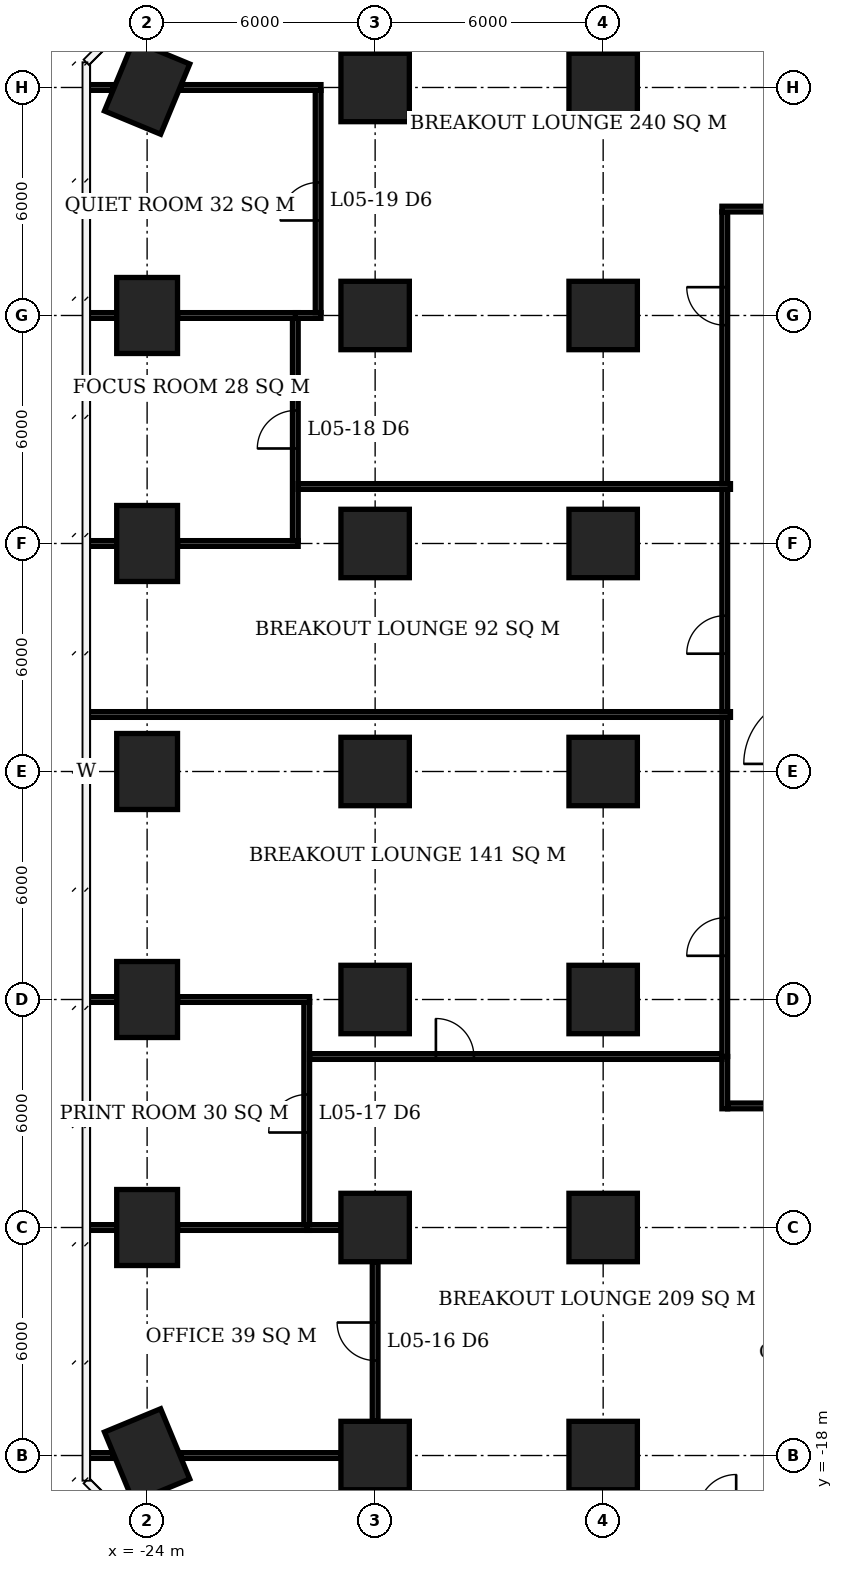
"""IFC4 building model, lengths in metres.
Left out: names, types, materials, properties, quantities, classifications, styles, units other than length and angle.
Written with IfcOpenShell. Run it as: python <this file> out.ifc"""

import sys

from ifc_helpers import new_model, si_unit, direction, frame, frame_2d, origin, origin_2d, place, context, subcontext, project, spatial, rectangle, extrude, element, fill, save


model = new_model("IFC4")
c1 = context("Model", 3, precision=1e-05, world=origin(), true_north=direction((0.0, 1.0)))
c2 = subcontext(c1, "Body", "Model", "MODEL_VIEW")
j1 = project(units=[si_unit("LENGTHUNIT", "METRE"), si_unit("PLANEANGLEUNIT", "RADIAN")], contexts=[c1])
p1 = place(None, origin())
s1 = spatial("IfcSite", under=j1, at=p1, CompositionType="ELEMENT")
p2 = place(p1, origin())
s2 = spatial("IfcBuilding", under=s1, at=p2, CompositionType="ELEMENT")
p3 = place(p2, frame((0.0, 0.0, 26.0)))
s3 = spatial("IfcBuildingStorey", under=s2, at=p3, CompositionType="ELEMENT", Elevation=26.0)
for number, where, z_axis, x_axis in (
    (1, (-24.0, -18.0, 0.0), (0.0, 0.0, 1.0), (-0.383, 0.924, 0.0)),
    (2, (-24.0, -12.0, 0.0), (0.0, 0.0, 1.0), (0.0, 1.0, 0.0)),
    (3, (-24.0, -6.0, 0.0), (0.0, 0.0, 1.0), (0.0, 1.0, 0.0)),
    (4, (-24.0, 0.0, 0.0), (0.0, 0.0, 1.0), (0.0, 1.0, 0.0)),
    (5, (-24.0, 6.0, 0.0), (0.0, 0.0, 1.0), (0.0, 1.0, 0.0)),
    (6, (-24.0, 12.0, 0.0), (0.0, 0.0, 1.0), (0.0, 1.0, 0.0)),
    (7, (-24.0, 18.0, 0.0), (0.0, 0.0, 1.0), (0.383, 0.924, 0.0)),
):
    element("IfcColumn", number, at=place(p3, frame(where, z_axis=z_axis, x_axis=x_axis)), inside=s3, PredefinedType="COLUMN", context=c2, shape_type="SweptSolid", body=[
        extrude(rectangle(XDim=2.0, YDim=1.6, at=origin_2d()), origin(), (0.0, 0.0, 1.0), 3.9),
    ])
for number, where, z_axis, x_axis in (
    (8, (-18.0, -18.0, 0.0), (0.0, 0.0, 1.0), (1.0, 0.0, 0.0)),
    (9, (-18.0, -12.0, 0.0), (0.0, 0.0, 1.0), (1.0, 0.0, 0.0)),
    (10, (-18.0, -6.0, 0.0), (0.0, 0.0, 1.0), (1.0, 0.0, 0.0)),
    (11, (-18.0, 0.0, 0.0), (0.0, 0.0, 1.0), (1.0, 0.0, 0.0)),
    (12, (-18.0, 6.0, 0.0), (0.0, 0.0, 1.0), (1.0, 0.0, 0.0)),
    (13, (-18.0, 12.0, 0.0), (0.0, 0.0, 1.0), (1.0, 0.0, 0.0)),
    (14, (-18.0, 18.0, 0.0), (0.0, 0.0, 1.0), (1.0, 0.0, 0.0)),
    (15, (-12.0, -18.0, 0.0), (0.0, 0.0, 1.0), (1.0, 0.0, 0.0)),
    (16, (-12.0, -12.0, 0.0), (0.0, 0.0, 1.0), (1.0, 0.0, 0.0)),
    (17, (-12.0, -6.0, 0.0), (0.0, 0.0, 1.0), (1.0, 0.0, 0.0)),
    (18, (-12.0, 0.0, 0.0), (0.0, 0.0, 1.0), (1.0, 0.0, 0.0)),
    (19, (-12.0, 6.0, 0.0), (0.0, 0.0, 1.0), (1.0, 0.0, 0.0)),
    (20, (-12.0, 12.0, 0.0), (0.0, 0.0, 1.0), (1.0, 0.0, 0.0)),
    (21, (-12.0, 18.0, 0.0), (0.0, 0.0, 1.0), (1.0, 0.0, 0.0)),
):
    element("IfcColumn", number, at=place(p3, frame(where, z_axis=z_axis, x_axis=x_axis)), inside=s3, PredefinedType="COLUMN", context=c2, shape_type="SweptSolid", body=[
        extrude(rectangle(XDim=1.8, YDim=1.8, at=origin_2d()), origin(), (0.0, 0.0, 1.0), 3.9),
    ])
p4 = place(p3, frame((-25.6, -18.0, 0.0), z_axis=(0.0, 0.0, 1.0), x_axis=(1.0, 0.0, 0.0)))
e22 = element("IfcWall", 22, at=p4, inside=s3, PredefinedType="PARTITIONING", context=c2, shape_type="SweptSolid", body=[
    extrude(rectangle(XDim=0.703, YDim=0.15, at=frame_2d((0.352, 0.0))), origin(), (0.0, 0.0, 1.0), 3.65),
])
p5 = place(p3, frame((-23.103, -18.0, 0.0), z_axis=(0.0, 0.0, 1.0), x_axis=(1.0, 0.0, 0.0)))
e23 = element("IfcWall", 23, at=p5, inside=s3, PredefinedType="PARTITIONING", context=c2, shape_type="SweptSolid", body=[
    extrude(rectangle(XDim=4.203, YDim=0.15, at=frame_2d((2.102, 0.0))), origin(), (0.0, 0.0, 1.0), 3.65),
])
p6 = place(p3, frame((-25.6, -12.0, 0.0), z_axis=(0.0, 0.0, 1.0), x_axis=(1.0, 0.0, 0.0)))
e24 = element("IfcWall", 24, at=p6, inside=s3, PredefinedType="PARTITIONING", context=c2, shape_type="SweptSolid", body=[
    extrude(rectangle(XDim=0.8, YDim=0.15, at=frame_2d((0.4, 0.0))), origin(), (0.0, 0.0, 1.0), 3.65),
])
p7 = place(p3, frame((-23.2, -12.0, 0.0), z_axis=(0.0, 0.0, 1.0), x_axis=(1.0, 0.0, 0.0)))
e25 = element("IfcWall", 25, at=p7, inside=s3, PredefinedType="PARTITIONING", context=c2, shape_type="SweptSolid", body=[
    extrude(rectangle(XDim=3.475, YDim=0.15, at=frame_2d((1.737, 0.0))), origin(), (0.0, 0.0, 1.0), 3.65),
])
p8 = place(p3, frame((-19.8, -12.0, 0.0), z_axis=(0.0, 0.0, 1.0), x_axis=(1.0, 0.0, 0.0)))
e26 = element("IfcWall", 26, at=p8, inside=s3, PredefinedType="PARTITIONING", context=c2, shape_type="SweptSolid", body=[
    extrude(rectangle(XDim=0.9, YDim=0.15, at=frame_2d((0.45, 0.0))), origin(), (0.0, 0.0, 1.0), 3.65),
])
p9 = place(p3, frame((-25.6, -6.0, 0.0), z_axis=(0.0, 0.0, 1.0), x_axis=(1.0, 0.0, 0.0)))
e27 = element("IfcWall", 27, at=p9, inside=s3, PredefinedType="PARTITIONING", context=c2, shape_type="SweptSolid", body=[
    extrude(rectangle(XDim=0.8, YDim=0.15, at=frame_2d((0.4, 0.0))), origin(), (0.0, 0.0, 1.0), 3.65),
])
p10 = place(p3, frame((-23.2, -6.0, 0.0), z_axis=(0.0, 0.0, 1.0), x_axis=(1.0, 0.0, 0.0)))
e28 = element("IfcWall", 28, at=p10, inside=s3, PredefinedType="PARTITIONING", context=c2, shape_type="SweptSolid", body=[
    extrude(rectangle(XDim=3.475, YDim=0.15, at=frame_2d((1.737, 0.0))), origin(), (0.0, 0.0, 1.0), 3.65),
])
p11 = place(p3, frame((-25.6, 6.0, 0.0), z_axis=(0.0, 0.0, 1.0), x_axis=(1.0, 0.0, 0.0)))
e29 = element("IfcWall", 29, at=p11, inside=s3, PredefinedType="PARTITIONING", context=c2, shape_type="SweptSolid", body=[
    extrude(rectangle(XDim=0.8, YDim=0.15, at=frame_2d((0.4, 0.0))), origin(), (0.0, 0.0, 1.0), 3.65),
])
p12 = place(p3, frame((-23.2, 6.0, 0.0), z_axis=(0.0, 0.0, 1.0), x_axis=(1.0, 0.0, 0.0)))
e30 = element("IfcWall", 30, at=p12, inside=s3, PredefinedType="PARTITIONING", context=c2, shape_type="SweptSolid", body=[
    extrude(rectangle(XDim=3.175, YDim=0.15, at=frame_2d((1.587, 0.0))), origin(), (0.0, 0.0, 1.0), 3.65),
])
p13 = place(p3, frame((-25.6, 12.0, 0.0), z_axis=(0.0, 0.0, 1.0), x_axis=(1.0, 0.0, 0.0)))
e31 = element("IfcWall", 31, at=p13, inside=s3, PredefinedType="PARTITIONING", context=c2, shape_type="SweptSolid", body=[
    extrude(rectangle(XDim=0.8, YDim=0.15, at=frame_2d((0.4, 0.0))), origin(), (0.0, 0.0, 1.0), 3.65),
])
p14 = place(p3, frame((-23.2, 12.0, 0.0), z_axis=(0.0, 0.0, 1.0), x_axis=(1.0, 0.0, 0.0)))
e32 = element("IfcWall", 32, at=p14, inside=s3, PredefinedType="PARTITIONING", context=c2, shape_type="SweptSolid", body=[
    extrude(rectangle(XDim=3.175, YDim=0.15, at=frame_2d((1.587, 0.0))), origin(), (0.0, 0.0, 1.0), 3.65),
])
p15 = place(p3, frame((-20.1, 12.0, 0.0), z_axis=(0.0, 0.0, 1.0), x_axis=(1.0, 0.0, 0.0)))
e33 = element("IfcWall", 33, at=p15, inside=s3, PredefinedType="PARTITIONING", context=c2, shape_type="SweptSolid", body=[
    extrude(rectangle(XDim=0.675, YDim=0.15, at=frame_2d((0.337, 0.0))), origin(), (0.0, 0.0, 1.0), 3.65),
])
p16 = place(p3, frame((-25.6, 18.0, 0.0), z_axis=(0.0, 0.0, 1.0), x_axis=(1.0, 0.0, 0.0)))
e34 = element("IfcWall", 34, at=p16, inside=s3, PredefinedType="PARTITIONING", context=c2, shape_type="SweptSolid", body=[
    extrude(rectangle(XDim=0.703, YDim=0.15, at=frame_2d((0.352, 0.0))), origin(), (0.0, 0.0, 1.0), 3.65),
])
p17 = place(p3, frame((-23.103, 18.0, 0.0), z_axis=(0.0, 0.0, 1.0), x_axis=(1.0, 0.0, 0.0)))
e35 = element("IfcWall", 35, at=p17, inside=s3, PredefinedType="PARTITIONING", context=c2, shape_type="SweptSolid", body=[
    extrude(rectangle(XDim=3.678, YDim=0.15, at=frame_2d((1.839, 0.0))), origin(), (0.0, 0.0, 1.0), 3.65),
])
p18 = place(p3, frame((-20.1, 6.075, 0.0), z_axis=(0.0, 0.0, 1.0), x_axis=(0.0, 1.0, 0.0)))
e36 = element("IfcWall", 36, at=p18, inside=s3, PredefinedType="PARTITIONING", context=c2, shape_type="SweptSolid", body=[
    extrude(rectangle(XDim=5.85, YDim=0.15, at=frame_2d((2.925, 0.0))), origin(), (0.0, 0.0, 1.0), 3.65),
])
p19 = place(p18, frame((2.425, 0.0, 0.0)))
e37 = element("IfcOpeningElement", 37, at=p19, cuts=e36, PredefinedType="OPENING", context=c2, shape_type="SweptSolid", body=[
    extrude(rectangle(XDim=1.0, YDim=2.1, at=frame_2d((0.5, 1.05))), frame((0.0, 0.085, 0.0), z_axis=(0.0, -1.0, 0.0), x_axis=(1.0, 0.0, 0.0)), (0.0, 0.0, 1.0), 0.17),
])
p20 = place(p3, frame((-19.8, -11.925, 0.0), z_axis=(0.0, 0.0, 1.0), x_axis=(0.0, 1.0, 0.0)))
e38 = element("IfcWall", 38, at=p20, inside=s3, PredefinedType="PARTITIONING", context=c2, shape_type="SweptSolid", body=[
    extrude(rectangle(XDim=5.85, YDim=0.15, at=frame_2d((2.925, 0.0))), origin(), (0.0, 0.0, 1.0), 3.65),
])
p21 = place(p20, frame((2.425, 0.0, 0.0)))
e39 = element("IfcOpeningElement", 39, at=p21, cuts=e38, PredefinedType="OPENING", context=c2, shape_type="SweptSolid", body=[
    extrude(rectangle(XDim=1.0, YDim=2.1, at=frame_2d((0.5, 1.05))), frame((0.0, 0.085, 0.0), z_axis=(0.0, -1.0, 0.0), x_axis=(1.0, 0.0, 0.0)), (0.0, 0.0, 1.0), 0.17),
])
p22 = place(p3, frame((-19.5, 12.075, 0.0), z_axis=(0.0, 0.0, 1.0), x_axis=(0.0, 1.0, 0.0)))
e40 = element("IfcWall", 40, at=p22, inside=s3, PredefinedType="PARTITIONING", context=c2, shape_type="SweptSolid", body=[
    extrude(rectangle(XDim=5.85, YDim=0.15, at=frame_2d((2.925, 0.0))), origin(), (0.0, 0.0, 1.0), 3.65),
])
p23 = place(p22, frame((2.425, 0.0, 0.0)))
e41 = element("IfcOpeningElement", 41, at=p23, cuts=e40, PredefinedType="OPENING", context=c2, shape_type="SweptSolid", body=[
    extrude(rectangle(XDim=1.0, YDim=2.1, at=frame_2d((0.5, 1.05))), frame((0.0, 0.085, 0.0), z_axis=(0.0, -1.0, 0.0), x_axis=(1.0, 0.0, 0.0)), (0.0, 0.0, 1.0), 0.17),
])
p24 = place(p3, frame((-18.0, -17.1, 0.0), z_axis=(0.0, 0.0, 1.0), x_axis=(0.0, 1.0, 0.0)))
e42 = element("IfcWall", 42, at=p24, inside=s3, PredefinedType="PARTITIONING", context=c2, shape_type="SweptSolid", body=[
    extrude(rectangle(XDim=4.2, YDim=0.15, at=frame_2d((2.1, 0.0))), origin(), (0.0, 0.0, 1.0), 3.65),
])
p25 = place(p24, frame((1.6, 0.0, 0.0)))
e43 = element("IfcOpeningElement", 43, at=p25, cuts=e42, PredefinedType="OPENING", context=c2, shape_type="SweptSolid", body=[
    extrude(rectangle(XDim=1.0, YDim=2.1, at=frame_2d((0.5, 1.05))), frame((0.0, 0.085, 0.0), z_axis=(0.0, -1.0, 0.0), x_axis=(1.0, 0.0, 0.0)), (0.0, 0.0, 1.0), 0.17),
])
p26 = place(p3, frame((-25.6, 1.5, 0.0), z_axis=(0.0, 0.0, 1.0), x_axis=(1.0, 0.0, 0.0)))
e44 = element("IfcWall", 44, at=p26, inside=s3, PredefinedType="PARTITIONING", context=c2, shape_type="SweptSolid", body=[
    extrude(rectangle(XDim=16.95, YDim=0.15, at=frame_2d((8.475, 0.0))), origin(), (0.0, 0.0, 1.0), 3.65),
])
p27 = place(p3, frame((-20.025, 7.5, 0.0), z_axis=(0.0, 0.0, 1.0), x_axis=(1.0, 0.0, 0.0)))
e45 = element("IfcWall", 45, at=p27, inside=s3, PredefinedType="PARTITIONING", context=c2, shape_type="SweptSolid", body=[
    extrude(rectangle(XDim=11.375, YDim=0.15, at=frame_2d((5.688, 0.0))), origin(), (0.0, 0.0, 1.0), 3.65),
])
p28 = place(p3, frame((-19.725, -7.5, 0.0), z_axis=(0.0, 0.0, 1.0), x_axis=(1.0, 0.0, 0.0)))
e46 = element("IfcWall", 46, at=p28, inside=s3, PredefinedType="PARTITIONING", context=c2, shape_type="SweptSolid", body=[
    extrude(rectangle(XDim=10.85, YDim=0.15, at=frame_2d((5.425, 0.0))), origin(), (0.0, 0.0, 1.0), 3.65),
])
p29 = place(p28, frame((3.324, 0.0, 0.0)))
e47 = element("IfcOpeningElement", 47, at=p29, cuts=e46, PredefinedType="OPENING", context=c2, shape_type="SweptSolid", body=[
    extrude(rectangle(XDim=1.0, YDim=2.1, at=frame_2d((0.5, 1.05))), frame((0.0, 0.085, 0.0), z_axis=(0.0, -1.0, 0.0), x_axis=(1.0, 0.0, 0.0)), (0.0, 0.0, 1.0), 0.17),
])
p30 = place(p3, frame((-8.8, -8.875, 0.0), z_axis=(0.0, 0.0, 1.0), x_axis=(0.0, 1.0, 0.0)))
e48 = element("IfcWall", 48, at=p30, inside=s3, PredefinedType="PARTITIONING", context=c2, shape_type="SweptSolid", body=[
    extrude(rectangle(XDim=1.375, YDim=0.15, at=frame_2d((0.688, 0.0))), origin(), (0.0, 0.0, 1.0), 3.65),
])
p31 = place(p3, frame((-8.725, -8.8, 0.0), z_axis=(0.0, 0.0, 1.0), x_axis=(1.0, 0.0, 0.0)))
e49 = element("IfcWall", 49, at=p31, inside=s3, PredefinedType="PARTITIONING", context=c2, shape_type="SweptSolid", body=[
    extrude(rectangle(XDim=1.325, YDim=0.15, at=frame_2d((0.663, 0.0))), origin(), (0.0, 0.0, 1.0), 3.65),
])
p32 = place(p3, frame((-8.8, -7.5, 0.0), z_axis=(0.0, 0.0, 1.0), x_axis=(0.0, 1.0, 0.0)))
e50 = element("IfcWall", 50, at=p32, inside=s3, PredefinedType="PARTITIONING", context=c2, shape_type="SweptSolid", body=[
    extrude(rectangle(XDim=8.925, YDim=0.15, at=frame_2d((4.462, 0.0))), origin(), (0.0, 0.0, 1.0), 3.65),
])
p33 = place(p32, frame((2.65, 0.0, 0.0)))
e51 = element("IfcOpeningElement", 51, at=p33, cuts=e50, PredefinedType="OPENING", context=c2, shape_type="SweptSolid", body=[
    extrude(rectangle(XDim=1.0, YDim=2.1, at=frame_2d((0.5, 1.05))), frame((0.0, 0.085, 0.0), z_axis=(0.0, -1.0, 0.0), x_axis=(1.0, 0.0, 0.0)), (0.0, 0.0, 1.0), 0.17),
])
p34 = place(p3, frame((-8.8, 1.575, 0.0), z_axis=(0.0, 0.0, 1.0), x_axis=(0.0, 1.0, 0.0)))
e52 = element("IfcWall", 52, at=p34, inside=s3, PredefinedType="PARTITIONING", context=c2, shape_type="SweptSolid", body=[
    extrude(rectangle(XDim=5.85, YDim=0.15, at=frame_2d((2.925, 0.0))), origin(), (0.0, 0.0, 1.0), 3.65),
])
p35 = place(p34, frame((1.525, 0.0, 0.0)))
e53 = element("IfcOpeningElement", 53, at=p35, cuts=e52, PredefinedType="OPENING", context=c2, shape_type="SweptSolid", body=[
    extrude(rectangle(XDim=1.0, YDim=2.1, at=frame_2d((0.5, 1.05))), frame((0.0, 0.085, 0.0), z_axis=(0.0, -1.0, 0.0), x_axis=(1.0, 0.0, 0.0)), (0.0, 0.0, 1.0), 0.17),
])
p36 = place(p3, frame((-8.8, 7.575, 0.0), z_axis=(0.0, 0.0, 1.0), x_axis=(0.0, 1.0, 0.0)))
e54 = element("IfcWall", 54, at=p36, inside=s3, PredefinedType="PARTITIONING", context=c2, shape_type="SweptSolid", body=[
    extrude(rectangle(XDim=7.15, YDim=0.15, at=frame_2d((3.575, 0.0))), origin(), (0.0, 0.0, 1.0), 3.65),
])
p37 = place(p36, frame((4.17, 0.0, 0.0)))
e55 = element("IfcOpeningElement", 55, at=p37, cuts=e54, PredefinedType="OPENING", context=c2, shape_type="SweptSolid", body=[
    extrude(rectangle(XDim=1.0, YDim=2.1, at=frame_2d((0.5, 1.05))), frame((0.0, 0.085, 0.0), z_axis=(0.0, -1.0, 0.0), x_axis=(1.0, 0.0, 0.0)), (0.0, 0.0, 1.0), 0.17),
])
p38 = place(p3, frame((-8.875, 14.8, 0.0), z_axis=(0.0, 0.0, 1.0), x_axis=(1.0, 0.0, 0.0)))
e56 = element("IfcWall", 56, at=p38, inside=s3, PredefinedType="PARTITIONING", context=c2, shape_type="SweptSolid", body=[
    extrude(rectangle(XDim=1.475, YDim=0.15, at=frame_2d((0.738, 0.0))), origin(), (0.0, 0.0, 1.0), 3.65),
])
p39 = place(p25, origin())
e57 = element("IfcDoor", 57, at=p39, inside=s3, OperationType="SINGLE_SWING_RIGHT", PredefinedType="DOOR", context=c2, shape_type="SweptSolid", body=[
    extrude(rectangle(XDim=1.0, YDim=2.1, at=frame_2d((0.5, 1.05))), frame((0.0, 0.025, 0.0), z_axis=(0.0, -1.0, 0.0), x_axis=(1.0, 0.0, 0.0)), (0.0, 0.0, 1.0), 0.05),
])
fill(e43, e57)
p40 = place(p21, origin())
e58 = element("IfcDoor", 58, at=p40, inside=s3, OperationType="SINGLE_SWING_LEFT", PredefinedType="DOOR", context=c2, shape_type="SweptSolid", body=[
    extrude(rectangle(XDim=1.0, YDim=2.1, at=frame_2d((0.5, 1.05))), frame((0.0, 0.025, 0.0), z_axis=(0.0, -1.0, 0.0), x_axis=(1.0, 0.0, 0.0)), (0.0, 0.0, 1.0), 0.05),
])
fill(e39, e58)
p41 = place(p19, origin())
e59 = element("IfcDoor", 59, at=p41, inside=s3, OperationType="SINGLE_SWING_LEFT", PredefinedType="DOOR", context=c2, shape_type="SweptSolid", body=[
    extrude(rectangle(XDim=1.0, YDim=2.1, at=frame_2d((0.5, 1.05))), frame((0.0, 0.025, 0.0), z_axis=(0.0, -1.0, 0.0), x_axis=(1.0, 0.0, 0.0)), (0.0, 0.0, 1.0), 0.05),
])
fill(e37, e59)
p42 = place(p23, origin())
e60 = element("IfcDoor", 60, at=p42, inside=s3, OperationType="SINGLE_SWING_LEFT", PredefinedType="DOOR", context=c2, shape_type="SweptSolid", body=[
    extrude(rectangle(XDim=1.0, YDim=2.1, at=frame_2d((0.5, 1.05))), frame((0.0, 0.025, 0.0), z_axis=(0.0, -1.0, 0.0), x_axis=(1.0, 0.0, 0.0)), (0.0, 0.0, 1.0), 0.05),
])
fill(e41, e60)
p43 = place(p29, origin())
e61 = element("IfcDoor", 61, at=p43, inside=s3, OperationType="SINGLE_SWING_LEFT", PredefinedType="DOOR", context=c2, shape_type="SweptSolid", body=[
    extrude(rectangle(XDim=1.0, YDim=2.1, at=frame_2d((0.5, 1.05))), frame((0.0, 0.025, 0.0), z_axis=(0.0, -1.0, 0.0), x_axis=(1.0, 0.0, 0.0)), (0.0, 0.0, 1.0), 0.05),
])
fill(e47, e61)
p44 = place(p33, origin())
e62 = element("IfcDoor", 62, at=p44, inside=s3, OperationType="SINGLE_SWING_LEFT", PredefinedType="DOOR", context=c2, shape_type="SweptSolid", body=[
    extrude(rectangle(XDim=1.0, YDim=2.1, at=frame_2d((0.5, 1.05))), frame((0.0, 0.025, 0.0), z_axis=(0.0, -1.0, 0.0), x_axis=(1.0, 0.0, 0.0)), (0.0, 0.0, 1.0), 0.05),
])
fill(e51, e62)
p45 = place(p35, origin())
e63 = element("IfcDoor", 63, at=p45, inside=s3, OperationType="SINGLE_SWING_LEFT", PredefinedType="DOOR", context=c2, shape_type="SweptSolid", body=[
    extrude(rectangle(XDim=1.0, YDim=2.1, at=frame_2d((0.5, 1.05))), frame((0.0, 0.025, 0.0), z_axis=(0.0, -1.0, 0.0), x_axis=(1.0, 0.0, 0.0)), (0.0, 0.0, 1.0), 0.05),
])
fill(e53, e63)
p46 = place(p37, origin())
e64 = element("IfcDoor", 64, at=p46, inside=s3, OperationType="SINGLE_SWING_RIGHT", PredefinedType="DOOR", context=c2, shape_type="SweptSolid", body=[
    extrude(rectangle(XDim=1.0, YDim=2.1, at=frame_2d((0.5, 1.05))), frame((0.0, 0.025, 0.0), z_axis=(0.0, -1.0, 0.0), x_axis=(1.0, 0.0, 0.0)), (0.0, 0.0, 1.0), 0.05),
])
fill(e55, e64)
save(model, sys.argv[1])
